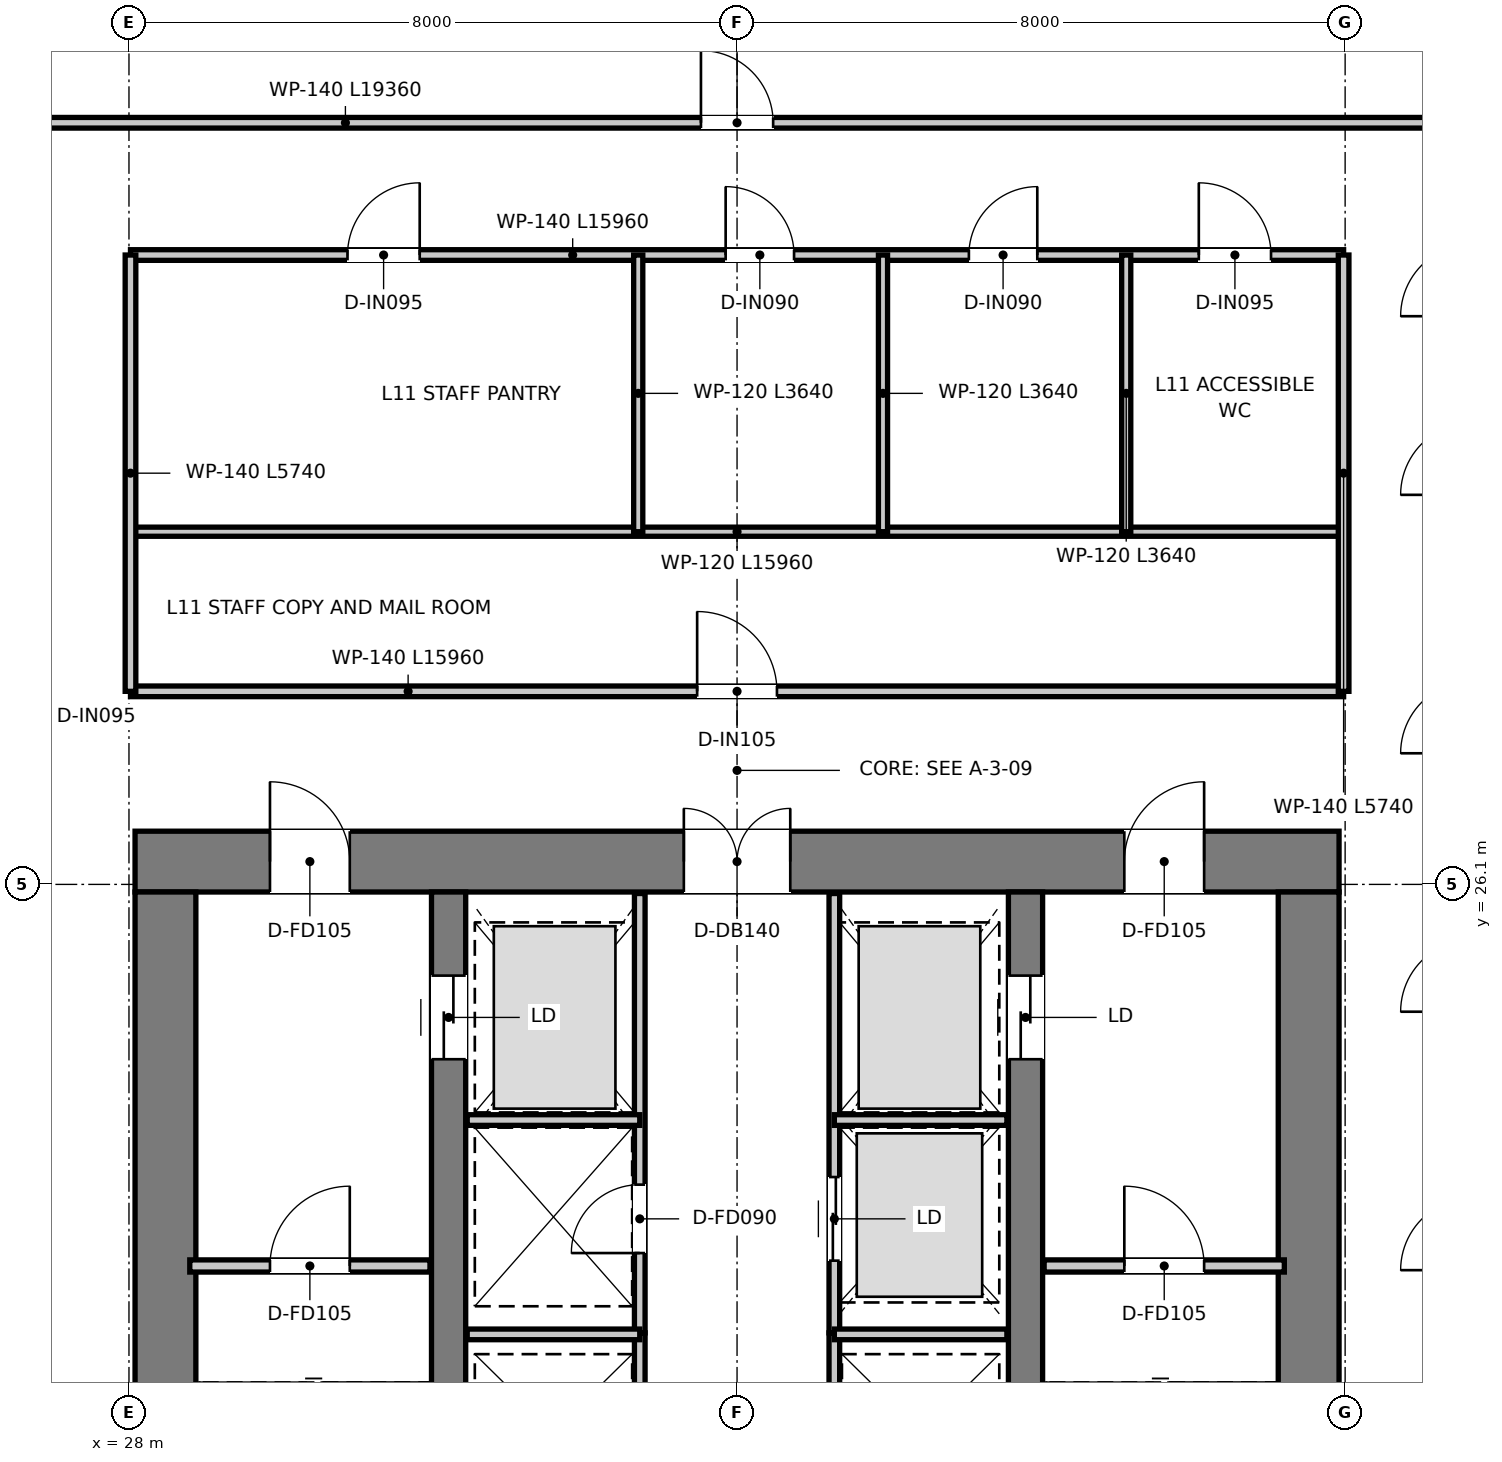
"""IFC4 building model, lengths in metres.
Left out: names, types, materials, properties, quantities, classifications, styles, units other than length and angle.
Written with IfcOpenShell. Run it as: python <this file> out.ifc"""

import sys

from ifc_helpers import new_model, si_unit, direction, frame, frame_2d, origin, place, context, subcontext, project, spatial, rectangle, extrude, element, fill, save


model = new_model("IFC4")
c1 = context("Model", 3, precision=1e-05, world=origin(), true_north=direction((0.0, 1.0)))
c2 = subcontext(c1, "Body", "Model", "MODEL_VIEW")
j1 = project(units=[si_unit("LENGTHUNIT", "METRE"), si_unit("PLANEANGLEUNIT", "RADIAN")], contexts=[c1])
p1 = place(None, origin())
s1 = spatial("IfcSite", under=j1, at=p1, CompositionType="ELEMENT")
p2 = place(p1, origin())
s2 = spatial("IfcBuilding", under=s1, at=p2, CompositionType="ELEMENT")
p3 = place(p2, frame((0.0, 0.0, 48.7)))
s3 = spatial("IfcBuildingStorey", under=s2, at=p3, CompositionType="ELEMENT", Elevation=48.7)
p4 = place(p3, frame((28.08, 26.4, 0.0), z_axis=(0.0, 0.0, 1.0), x_axis=(1.0, 0.0, 0.0)))
e1 = element("IfcWall", 1, at=p4, inside=s3, PredefinedType="SHEAR", context=c2, shape_type="SweptSolid", body=[
    extrude(rectangle(XDim=15.84, YDim=0.8, at=frame_2d((7.92, 0.0))), origin(), (0.0, 0.0, 1.0), 3.95),
])
p5 = place(p4, frame((7.22, 0.0, 0.0)))
e2 = element("IfcOpeningElement", 2, at=p5, cuts=e1, PredefinedType="OPENING", context=c2, shape_type="SweptSolid", body=[
    extrude(rectangle(XDim=1.4, YDim=2.2, at=frame_2d((0.7, 1.1))), frame((0.0, 0.41, 0.0), z_axis=(0.0, -1.0, 0.0), x_axis=(1.0, 0.0, 0.0)), (0.0, 0.0, 1.0), 0.82),
])
p6 = place(p4, frame((1.775, 0.0, 0.0)))
e3 = element("IfcOpeningElement", 3, at=p6, cuts=e1, PredefinedType="OPENING", context=c2, shape_type="SweptSolid", body=[
    extrude(rectangle(XDim=1.05, YDim=2.1, at=frame_2d((0.525, 1.05))), frame((0.0, 0.41, 0.0), z_axis=(0.0, -1.0, 0.0), x_axis=(1.0, 0.0, 0.0)), (0.0, 0.0, 1.0), 0.82),
])
p7 = place(p4, frame((13.015, 0.0, 0.0)))
e4 = element("IfcOpeningElement", 4, at=p7, cuts=e1, PredefinedType="OPENING", context=c2, shape_type="SweptSolid", body=[
    extrude(rectangle(XDim=1.05, YDim=2.1, at=frame_2d((0.525, 1.05))), frame((0.0, 0.41, 0.0), z_axis=(0.0, -1.0, 0.0), x_axis=(1.0, 0.0, 0.0)), (0.0, 0.0, 1.0), 0.82),
])
for number, where, z_axis, x_axis in (
    (5, (28.48, 11.3, 0.0), (0.0, 0.0, 1.0), (0.0, 1.0, 0.0)),
    (6, (43.52, 11.3, 0.0), (0.0, 0.0, 1.0), (0.0, 1.0, 0.0)),
):
    element("IfcWall", number, at=place(p3, frame(where, z_axis=z_axis, x_axis=x_axis)), inside=s3, PredefinedType="SHEAR", context=c2, shape_type="SweptSolid", body=[
        extrude(rectangle(XDim=14.7, YDim=0.8, at=frame_2d((7.35, 0.0))), origin(), (0.0, 0.0, 1.0), 3.95),
    ])
p8 = place(p3, frame((32.205, 13.22, 0.0), z_axis=(0.0, 0.0, 1.0), x_axis=(0.0, 1.0, 0.0)))
e7 = element("IfcWall", 7, at=p8, inside=s3, PredefinedType="SHEAR", context=c2, shape_type="SweptSolid", body=[
    extrude(rectangle(XDim=12.78, YDim=0.45, at=frame_2d((6.39, 0.0))), origin(), (0.0, 0.0, 1.0), 3.95),
])
p9 = place(p8, frame((10.58, 0.0, 0.0)))
e8 = element("IfcOpeningElement", 8, at=p9, cuts=e7, PredefinedType="OPENING", context=c2, shape_type="SweptSolid", body=[
    extrude(rectangle(XDim=1.1, YDim=2.15, at=frame_2d((0.55, 1.075))), frame((0.0, 0.235, 0.0), z_axis=(0.0, -1.0, 0.0), x_axis=(1.0, 0.0, 0.0)), (0.0, 0.0, 1.0), 0.47),
])
p10 = place(p3, frame((39.795, 13.22, 0.0), z_axis=(0.0, 0.0, 1.0), x_axis=(0.0, 1.0, 0.0)))
e9 = element("IfcWall", 9, at=p10, inside=s3, PredefinedType="SHEAR", context=c2, shape_type="SweptSolid", body=[
    extrude(rectangle(XDim=12.78, YDim=0.45, at=frame_2d((6.39, 0.0))), origin(), (0.0, 0.0, 1.0), 3.95),
])
p11 = place(p10, frame((10.58, 0.0, 0.0)))
e10 = element("IfcOpeningElement", 10, at=p11, cuts=e9, PredefinedType="OPENING", context=c2, shape_type="SweptSolid", body=[
    extrude(rectangle(XDim=1.1, YDim=2.15, at=frame_2d((0.55, 1.075))), frame((0.0, 0.235, 0.0), z_axis=(0.0, -1.0, 0.0), x_axis=(1.0, 0.0, 0.0)), (0.0, 0.0, 1.0), 0.47),
])
p12 = place(p3, frame((28.8, 21.08, 0.0), z_axis=(0.0, 0.0, 1.0), x_axis=(1.0, 0.0, 0.0)))
e11 = element("IfcWall", 11, at=p12, inside=s3, PredefinedType="PARTITIONING", context=c2, shape_type="SweptSolid", body=[
    extrude(rectangle(XDim=3.16, YDim=0.16, at=frame_2d((1.58, 0.0))), origin(), (0.0, 0.0, 1.0), 3.67),
])
p13 = place(p12, frame((1.055, 0.0, 0.0)))
e12 = element("IfcOpeningElement", 12, at=p13, cuts=e11, PredefinedType="OPENING", context=c2, shape_type="SweptSolid", body=[
    extrude(rectangle(XDim=1.05, YDim=2.1, at=frame_2d((0.525, 1.05))), frame((0.0, 0.09, 0.0), z_axis=(0.0, -1.0, 0.0), x_axis=(1.0, 0.0, 0.0)), (0.0, 0.0, 1.0), 0.18),
])
p14 = place(p3, frame((40.04, 21.08, 0.0), z_axis=(0.0, 0.0, 1.0), x_axis=(1.0, 0.0, 0.0)))
e13 = element("IfcWall", 13, at=p14, inside=s3, PredefinedType="PARTITIONING", context=c2, shape_type="SweptSolid", body=[
    extrude(rectangle(XDim=3.16, YDim=0.16, at=frame_2d((1.58, 0.0))), origin(), (0.0, 0.0, 1.0), 3.67),
])
p15 = place(p14, frame((1.055, 0.0, 0.0)))
e14 = element("IfcOpeningElement", 14, at=p15, cuts=e13, PredefinedType="OPENING", context=c2, shape_type="SweptSolid", body=[
    extrude(rectangle(XDim=1.05, YDim=2.1, at=frame_2d((0.525, 1.05))), frame((0.0, 0.09, 0.0), z_axis=(0.0, -1.0, 0.0), x_axis=(1.0, 0.0, 0.0)), (0.0, 0.0, 1.0), 0.18),
])
p16 = place(p3, frame((34.72, 20.2, 0.0), z_axis=(0.0, 0.0, 1.0), x_axis=(0.0, 1.0, 0.0)))
e15 = element("IfcWall", 15, at=p16, inside=s3, PredefinedType="PARTITIONING", context=c2, shape_type="SweptSolid", body=[
    extrude(rectangle(XDim=5.78, YDim=0.14, at=frame_2d((2.89, 0.0))), origin(), (0.0, 0.0, 1.0), 2.47),
])
p17 = place(p16, frame((1.05, 0.0, 0.0)))
e16 = element("IfcOpeningElement", 16, at=p17, cuts=e15, PredefinedType="OPENING", context=c2, shape_type="SweptSolid", body=[
    extrude(rectangle(XDim=0.9, YDim=2.1, at=frame_2d((0.45, 1.05))), frame((0.0, 0.08, 0.0), z_axis=(0.0, -1.0, 0.0), x_axis=(1.0, 0.0, 0.0)), (0.0, 0.0, 1.0), 0.16),
])
p18 = place(p3, frame((37.28, 20.2, 0.0), z_axis=(0.0, 0.0, 1.0), x_axis=(0.0, 1.0, 0.0)))
e17 = element("IfcWall", 17, at=p18, inside=s3, PredefinedType="PARTITIONING", context=c2, shape_type="SweptSolid", body=[
    extrude(rectangle(XDim=5.78, YDim=0.14, at=frame_2d((2.89, 0.0))), origin(), (0.0, 0.0, 1.0), 2.47),
])
p19 = place(p18, frame((0.95, 0.0, 0.0)))
e18 = element("IfcOpeningElement", 18, at=p19, cuts=e17, PredefinedType="OPENING", context=c2, shape_type="SweptSolid", body=[
    extrude(rectangle(XDim=1.1, YDim=2.15, at=frame_2d((0.55, 1.075))), frame((0.0, 0.08, 0.0), z_axis=(0.0, -1.0, 0.0), x_axis=(1.0, 0.0, 0.0)), (0.0, 0.0, 1.0), 0.16),
])
for number, where, z_axis, x_axis in (
    (19, (32.45, 23.0, 0.0), (0.0, 0.0, 1.0), (1.0, 0.0, 0.0)),
    (20, (37.28, 23.0, 0.0), (0.0, 0.0, 1.0), (1.0, 0.0, 0.0)),
):
    element("IfcWall", number, at=place(p3, frame(where, z_axis=z_axis, x_axis=x_axis)), inside=s3, PredefinedType="PARTITIONING", context=c2, shape_type="SweptSolid", body=[
        extrude(rectangle(XDim=2.27, YDim=0.14, at=frame_2d((1.135, 0.0))), origin(), (0.0, 0.0, 1.0), 2.47),
    ])
for number, where, z_axis, x_axis in (
    (21, (34.72, 17.78, 0.0), (0.0, 0.0, 1.0), (0.0, 1.0, 0.0)),
    (22, (37.28, 17.78, 0.0), (0.0, 0.0, 1.0), (0.0, 1.0, 0.0)),
):
    element("IfcWall", number, at=place(p3, frame(where, z_axis=z_axis, x_axis=x_axis)), inside=s3, PredefinedType="PARTITIONING", context=c2, shape_type="SweptSolid", body=[
        extrude(rectangle(XDim=2.42, YDim=0.14, at=frame_2d((1.21, 0.0))), origin(), (0.0, 0.0, 1.0), 3.67),
    ])
for number, where, z_axis, x_axis in (
    (23, (32.45, 20.18, 0.0), (0.0, 0.0, 1.0), (1.0, 0.0, 0.0)),
    (24, (37.28, 20.18, 0.0), (0.0, 0.0, 1.0), (1.0, 0.0, 0.0)),
):
    element("IfcWall", number, at=place(p3, frame(where, z_axis=z_axis, x_axis=x_axis)), inside=s3, PredefinedType="PARTITIONING", context=c2, shape_type="SweptSolid", body=[
        extrude(rectangle(XDim=2.27, YDim=0.14, at=frame_2d((1.135, 0.0))), origin(), (0.0, 0.0, 1.0), 3.67),
    ])
p20 = place(p3, frame((28.02, 28.64, 0.0), z_axis=(0.0, 0.0, 1.0), x_axis=(1.0, 0.0, 0.0)))
e25 = element("IfcWall", 25, at=p20, inside=s3, PredefinedType="PARTITIONING", context=c2, shape_type="SweptSolid", body=[
    extrude(rectangle(XDim=15.96, YDim=0.14, at=frame_2d((7.98, 0.0))), origin(), (0.0, 0.0, 1.0), 3.08),
])
p21 = place(p20, frame((7.455, 0.0, 0.0)))
e26 = element("IfcOpeningElement", 26, at=p21, cuts=e25, PredefinedType="OPENING", context=c2, shape_type="SweptSolid", body=[
    extrude(rectangle(XDim=1.05, YDim=2.15, at=frame_2d((0.525, 1.075))), frame((0.0, 0.08, 0.0), z_axis=(0.0, -1.0, 0.0), x_axis=(1.0, 0.0, 0.0)), (0.0, 0.0, 1.0), 0.16),
])
p22 = place(p3, frame((28.02, 30.74, 0.0), z_axis=(0.0, 0.0, 1.0), x_axis=(1.0, 0.0, 0.0)))
e27 = element("IfcWall", 27, at=p22, inside=s3, PredefinedType="PARTITIONING", context=c2, shape_type="SweptSolid", body=[
    extrude(rectangle(XDim=15.96, YDim=0.12, at=frame_2d((7.98, 0.0))), origin(), (0.0, 0.0, 1.0), 3.08),
])
p23 = place(p3, frame((28.02, 34.38, 0.0), z_axis=(0.0, 0.0, 1.0), x_axis=(1.0, 0.0, 0.0)))
e28 = element("IfcWall", 28, at=p23, inside=s3, PredefinedType="PARTITIONING", context=c2, shape_type="SweptSolid", body=[
    extrude(rectangle(XDim=15.96, YDim=0.14, at=frame_2d((7.98, 0.0))), origin(), (0.0, 0.0, 1.0), 3.08),
])
p24 = place(p23, frame((7.83, 0.0, 0.0)))
e29 = element("IfcOpeningElement", 29, at=p24, cuts=e28, PredefinedType="OPENING", context=c2, shape_type="SweptSolid", body=[
    extrude(rectangle(XDim=0.9, YDim=2.1, at=frame_2d((0.45, 1.05))), frame((0.0, 0.08, 0.0), z_axis=(0.0, -1.0, 0.0), x_axis=(1.0, 0.0, 0.0)), (0.0, 0.0, 1.0), 0.16),
])
p25 = place(p23, frame((11.03, 0.0, 0.0)))
e30 = element("IfcOpeningElement", 30, at=p25, cuts=e28, PredefinedType="OPENING", context=c2, shape_type="SweptSolid", body=[
    extrude(rectangle(XDim=0.9, YDim=2.1, at=frame_2d((0.45, 1.05))), frame((0.0, 0.08, 0.0), z_axis=(0.0, -1.0, 0.0), x_axis=(1.0, 0.0, 0.0)), (0.0, 0.0, 1.0), 0.16),
])
p26 = place(p23, frame((14.055, 0.0, 0.0)))
e31 = element("IfcOpeningElement", 31, at=p26, cuts=e28, PredefinedType="OPENING", context=c2, shape_type="SweptSolid", body=[
    extrude(rectangle(XDim=0.95, YDim=2.1, at=frame_2d((0.475, 1.05))), frame((0.0, 0.08, 0.0), z_axis=(0.0, -1.0, 0.0), x_axis=(1.0, 0.0, 0.0)), (0.0, 0.0, 1.0), 0.16),
])
p27 = place(p23, frame((2.855, 0.0, 0.0)))
e32 = element("IfcOpeningElement", 32, at=p27, cuts=e28, PredefinedType="OPENING", context=c2, shape_type="SweptSolid", body=[
    extrude(rectangle(XDim=0.95, YDim=2.1, at=frame_2d((0.475, 1.05))), frame((0.0, 0.08, 0.0), z_axis=(0.0, -1.0, 0.0), x_axis=(1.0, 0.0, 0.0)), (0.0, 0.0, 1.0), 0.16),
])
for number, where, z_axis, x_axis in (
    (33, (28.02, 28.64, 0.0), (0.0, 0.0, 1.0), (0.0, 1.0, 0.0)),
    (34, (43.98, 28.64, 0.0), (0.0, 0.0, 1.0), (0.0, 1.0, 0.0)),
):
    element("IfcWall", number, at=place(p3, frame(where, z_axis=z_axis, x_axis=x_axis)), inside=s3, PredefinedType="PARTITIONING", context=c2, shape_type="SweptSolid", body=[
        extrude(rectangle(XDim=5.74, YDim=0.14, at=frame_2d((2.87, 0.0))), origin(), (0.0, 0.0, 1.0), 3.22),
    ])
for number, where, z_axis, x_axis in (
    (35, (37.92, 30.74, 0.0), (0.0, 0.0, 1.0), (0.0, 1.0, 0.0)),
    (36, (41.12, 30.74, 0.0), (0.0, 0.0, 1.0), (0.0, 1.0, 0.0)),
    (37, (34.7, 30.74, 0.0), (0.0, 0.0, 1.0), (0.0, 1.0, 0.0)),
):
    element("IfcWall", number, at=place(p3, frame(where, z_axis=z_axis, x_axis=x_axis)), inside=s3, PredefinedType="PARTITIONING", context=c2, shape_type="SweptSolid", body=[
        extrude(rectangle(XDim=3.64, YDim=0.12, at=frame_2d((1.82, 0.0))), origin(), (0.0, 0.0, 1.0), 3.12),
    ])
p28 = place(p3, frame((26.32, 36.12, 0.0), z_axis=(0.0, 0.0, 1.0), x_axis=(1.0, 0.0, 0.0)))
e38 = element("IfcWall", 38, at=p28, inside=s3, PredefinedType="PARTITIONING", context=c2, shape_type="SweptSolid", body=[
    extrude(rectangle(XDim=19.36, YDim=0.14, at=frame_2d((9.68, 0.0))), origin(), (0.0, 0.0, 1.0), 3.08),
])
p29 = place(p28, frame((9.205, 0.0, 0.0)))
e39 = element("IfcOpeningElement", 39, at=p29, cuts=e38, PredefinedType="OPENING", context=c2, shape_type="SweptSolid", body=[
    extrude(rectangle(XDim=0.95, YDim=2.1, at=frame_2d((0.475, 1.05))), frame((0.0, 0.08, 0.0), z_axis=(0.0, -1.0, 0.0), x_axis=(1.0, 0.0, 0.0)), (0.0, 0.0, 1.0), 0.16),
])
p30 = place(p13, origin())
e40 = element("IfcDoor", 40, at=p30, inside=s3, OperationType="SINGLE_SWING_RIGHT", PredefinedType="DOOR", context=c2, shape_type="SweptSolid", body=[
    extrude(rectangle(XDim=1.05, YDim=2.1, at=frame_2d((0.525, 1.05))), frame((0.0, 0.025, 0.0), z_axis=(0.0, -1.0, 0.0), x_axis=(1.0, 0.0, 0.0)), (0.0, 0.0, 1.0), 0.05),
])
fill(e12, e40)
p31 = place(p15, origin())
e41 = element("IfcDoor", 41, at=p31, inside=s3, OperationType="SINGLE_SWING_LEFT", PredefinedType="DOOR", context=c2, shape_type="SweptSolid", body=[
    extrude(rectangle(XDim=1.05, YDim=2.1, at=frame_2d((0.525, 1.05))), frame((0.0, 0.025, 0.0), z_axis=(0.0, -1.0, 0.0), x_axis=(1.0, 0.0, 0.0)), (0.0, 0.0, 1.0), 0.05),
])
fill(e14, e41)
p32 = place(p5, origin())
e42 = element("IfcDoor", 42, at=p32, inside=s3, OperationType="DOUBLE_DOOR_SINGLE_SWING", PredefinedType="DOOR", context=c2, shape_type="SweptSolid", body=[
    extrude(rectangle(XDim=1.4, YDim=2.2, at=frame_2d((0.7, 1.1))), frame((0.0, 0.025, 0.0), z_axis=(0.0, -1.0, 0.0), x_axis=(1.0, 0.0, 0.0)), (0.0, 0.0, 1.0), 0.05),
])
fill(e2, e42)
p33 = place(p6, origin())
e43 = element("IfcDoor", 43, at=p33, inside=s3, OperationType="SINGLE_SWING_LEFT", PredefinedType="DOOR", context=c2, shape_type="SweptSolid", body=[
    extrude(rectangle(XDim=1.05, YDim=2.1, at=frame_2d((0.525, 1.05))), frame((0.0, 0.025, 0.0), z_axis=(0.0, -1.0, 0.0), x_axis=(1.0, 0.0, 0.0)), (0.0, 0.0, 1.0), 0.05),
])
fill(e3, e43)
p34 = place(p7, origin())
e44 = element("IfcDoor", 44, at=p34, inside=s3, OperationType="SINGLE_SWING_RIGHT", PredefinedType="DOOR", context=c2, shape_type="SweptSolid", body=[
    extrude(rectangle(XDim=1.05, YDim=2.1, at=frame_2d((0.525, 1.05))), frame((0.0, 0.025, 0.0), z_axis=(0.0, -1.0, 0.0), x_axis=(1.0, 0.0, 0.0)), (0.0, 0.0, 1.0), 0.05),
])
fill(e4, e44)
p35 = place(p9, origin())
e45 = element("IfcDoor", 45, at=p35, inside=s3, OperationType="DOUBLE_DOOR_SLIDING", PredefinedType="DOOR", context=c2, shape_type="SweptSolid", body=[
    extrude(rectangle(XDim=1.1, YDim=2.15, at=frame_2d((0.55, 1.075))), frame((0.0, 0.025, 0.0), z_axis=(0.0, -1.0, 0.0), x_axis=(1.0, 0.0, 0.0)), (0.0, 0.0, 1.0), 0.05),
])
fill(e8, e45)
p36 = place(p11, origin())
e46 = element("IfcDoor", 46, at=p36, inside=s3, OperationType="DOUBLE_DOOR_SLIDING", PredefinedType="DOOR", context=c2, shape_type="SweptSolid", body=[
    extrude(rectangle(XDim=1.1, YDim=2.15, at=frame_2d((0.55, 1.075))), frame((0.0, 0.025, 0.0), z_axis=(0.0, -1.0, 0.0), x_axis=(1.0, 0.0, 0.0)), (0.0, 0.0, 1.0), 0.05),
])
fill(e10, e46)
p37 = place(p17, origin())
e47 = element("IfcDoor", 47, at=p37, inside=s3, OperationType="SINGLE_SWING_LEFT", PredefinedType="DOOR", context=c2, shape_type="SweptSolid", body=[
    extrude(rectangle(XDim=0.9, YDim=2.1, at=frame_2d((0.45, 1.05))), frame((0.0, 0.025, 0.0), z_axis=(0.0, -1.0, 0.0), x_axis=(1.0, 0.0, 0.0)), (0.0, 0.0, 1.0), 0.05),
])
fill(e16, e47)
p38 = place(p19, origin())
e48 = element("IfcDoor", 48, at=p38, inside=s3, OperationType="DOUBLE_DOOR_SLIDING", PredefinedType="DOOR", context=c2, shape_type="SweptSolid", body=[
    extrude(rectangle(XDim=1.1, YDim=2.15, at=frame_2d((0.55, 1.075))), frame((0.0, 0.025, 0.0), z_axis=(0.0, -1.0, 0.0), x_axis=(1.0, 0.0, 0.0)), (0.0, 0.0, 1.0), 0.05),
])
fill(e18, e48)
p39 = place(p21, origin())
e49 = element("IfcDoor", 49, at=p39, inside=s3, OperationType="SINGLE_SWING_LEFT", PredefinedType="DOOR", context=c2, shape_type="SweptSolid", body=[
    extrude(rectangle(XDim=1.05, YDim=2.15, at=frame_2d((0.525, 1.075))), frame((0.0, 0.025, 0.0), z_axis=(0.0, -1.0, 0.0), x_axis=(1.0, 0.0, 0.0)), (0.0, 0.0, 1.0), 0.05),
])
fill(e26, e49)
p40 = place(p24, origin())
e50 = element("IfcDoor", 50, at=p40, inside=s3, OperationType="SINGLE_SWING_LEFT", PredefinedType="DOOR", context=c2, shape_type="SweptSolid", body=[
    extrude(rectangle(XDim=0.9, YDim=2.1, at=frame_2d((0.45, 1.05))), frame((0.0, 0.025, 0.0), z_axis=(0.0, -1.0, 0.0), x_axis=(1.0, 0.0, 0.0)), (0.0, 0.0, 1.0), 0.05),
])
fill(e29, e50)
p41 = place(p25, origin())
e51 = element("IfcDoor", 51, at=p41, inside=s3, OperationType="SINGLE_SWING_RIGHT", PredefinedType="DOOR", context=c2, shape_type="SweptSolid", body=[
    extrude(rectangle(XDim=0.9, YDim=2.1, at=frame_2d((0.45, 1.05))), frame((0.0, 0.025, 0.0), z_axis=(0.0, -1.0, 0.0), x_axis=(1.0, 0.0, 0.0)), (0.0, 0.0, 1.0), 0.05),
])
fill(e30, e51)
p42 = place(p26, origin())
e52 = element("IfcDoor", 52, at=p42, inside=s3, OperationType="SINGLE_SWING_LEFT", PredefinedType="DOOR", context=c2, shape_type="SweptSolid", body=[
    extrude(rectangle(XDim=0.95, YDim=2.1, at=frame_2d((0.475, 1.05))), frame((0.0, 0.025, 0.0), z_axis=(0.0, -1.0, 0.0), x_axis=(1.0, 0.0, 0.0)), (0.0, 0.0, 1.0), 0.05),
])
fill(e31, e52)
p43 = place(p27, origin())
e53 = element("IfcDoor", 53, at=p43, inside=s3, OperationType="SINGLE_SWING_RIGHT", PredefinedType="DOOR", context=c2, shape_type="SweptSolid", body=[
    extrude(rectangle(XDim=0.95, YDim=2.1, at=frame_2d((0.475, 1.05))), frame((0.0, 0.025, 0.0), z_axis=(0.0, -1.0, 0.0), x_axis=(1.0, 0.0, 0.0)), (0.0, 0.0, 1.0), 0.05),
])
fill(e32, e53)
p44 = place(p29, origin())
e54 = element("IfcDoor", 54, at=p44, inside=s3, OperationType="SINGLE_SWING_LEFT", PredefinedType="DOOR", context=c2, shape_type="SweptSolid", body=[
    extrude(rectangle(XDim=0.95, YDim=2.1, at=frame_2d((0.475, 1.05))), frame((0.0, 0.025, 0.0), z_axis=(0.0, -1.0, 0.0), x_axis=(1.0, 0.0, 0.0)), (0.0, 0.0, 1.0), 0.05),
])
fill(e39, e54)
save(model, sys.argv[1])
